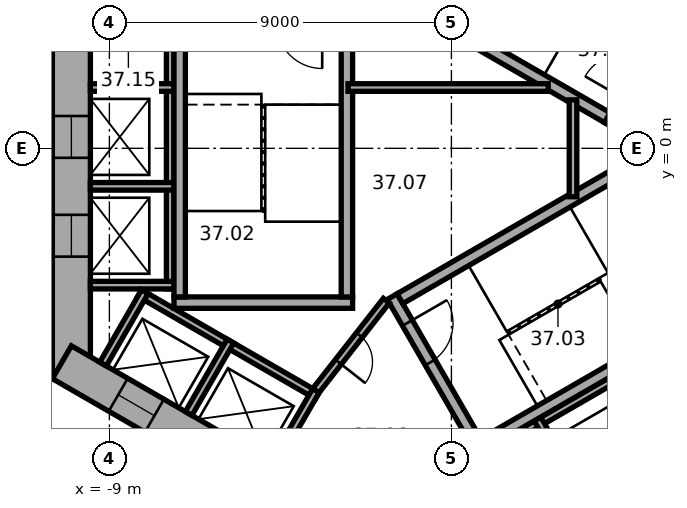
"""IFC4 building model, lengths in metres.
Left out: names, types, materials, properties, quantities, classifications, styles, units other than length and angle.
Written with IfcOpenShell. Run it as: python <this file> out.ifc"""

import sys

from ifc_helpers import new_model, si_unit, direction, frame, frame_2d, origin, place, context, subcontext, project, spatial, rectangle, extrude, element, fill, save


model = new_model("IFC4")
c1 = context("Model", 3, precision=1e-05, world=origin(), true_north=direction((0.0, 1.0)))
c2 = subcontext(c1, "Body", "Model", "MODEL_VIEW")
j1 = project(units=[si_unit("LENGTHUNIT", "METRE"), si_unit("PLANEANGLEUNIT", "RADIAN")], contexts=[c1])
p1 = place(None, origin())
s1 = spatial("IfcSite", under=j1, at=p1, CompositionType="ELEMENT")
p2 = place(p1, origin())
s2 = spatial("IfcBuilding", under=s1, at=p2, CompositionType="ELEMENT")
p3 = place(p2, frame((0.0, 0.0, 154.0)))
s3 = spatial("IfcBuildingStorey", under=s2, at=p3, CompositionType="ELEMENT", Elevation=154.0)
p4 = place(p3, frame((-10.0, 6.062, 0.0), z_axis=(0.0, 0.0, 1.0), x_axis=(0.0, -1.0, 0.0)))
e1 = element("IfcWall", 1, at=p4, inside=s3, PredefinedType="SHEAR", context=c2, shape_type="SweptSolid", body=[
    extrude(rectangle(XDim=12.125, YDim=1.0, at=frame_2d((6.062, 0.0))), origin(), (0.0, 0.0, 1.0), 3.7),
])
p5 = place(p4, frame((5.212, 0.0, 0.0)))
e2 = element("IfcOpeningElement", 2, at=p5, cuts=e1, PredefinedType="OPENING", context=c2, shape_type="SweptSolid", body=[
    extrude(rectangle(XDim=1.1, YDim=2.1, at=frame_2d((0.55, 1.05))), frame((0.0, 0.51, 0.0), z_axis=(0.0, -1.0, 0.0), x_axis=(1.0, 0.0, 0.0)), (0.0, 0.0, 1.0), 1.02),
])
p6 = place(p4, frame((7.812, 0.0, 0.0)))
e3 = element("IfcOpeningElement", 3, at=p6, cuts=e1, PredefinedType="OPENING", context=c2, shape_type="SweptSolid", body=[
    extrude(rectangle(XDim=1.1, YDim=2.1, at=frame_2d((0.55, 1.05))), frame((0.0, 0.51, 0.0), z_axis=(0.0, -1.0, 0.0), x_axis=(1.0, 0.0, 0.0)), (0.0, 0.0, 1.0), 1.02),
])
p7 = place(p3, frame((-10.25, -5.629, 0.0), z_axis=(0.0, 0.0, 1.0), x_axis=(0.866022616891, -0.50000482701, 0.0)))
e4 = element("IfcWall", 4, at=p7, inside=s3, PredefinedType="SHEAR", context=c2, shape_type="SweptSolid", body=[
    extrude(rectangle(XDim=12.125, YDim=1.0, at=frame_2d((6.062, 0.0))), origin(), (0.0, 0.0, 1.0), 3.7),
])
p8 = place(p7, frame((6.262, 0.0, 0.0)))
e5 = element("IfcOpeningElement", 5, at=p8, cuts=e4, PredefinedType="OPENING", context=c2, shape_type="SweptSolid", body=[
    extrude(rectangle(XDim=1.5, YDim=2.1, at=frame_2d((0.75, 1.05))), frame((0.0, 0.51, 0.0), z_axis=(0.0, -1.0, 0.0), x_axis=(1.0, 0.0, 0.0)), (0.0, 0.0, 1.0), 1.02),
])
p9 = place(p7, frame((1.712, 0.0, 0.0)))
e6 = element("IfcOpeningElement", 6, at=p9, cuts=e4, PredefinedType="OPENING", context=c2, shape_type="SweptSolid", body=[
    extrude(rectangle(XDim=1.1, YDim=2.1, at=frame_2d((0.55, 1.05))), frame((0.0, 0.51, 0.0), z_axis=(0.0, -1.0, 0.0), x_axis=(1.0, 0.0, 0.0)), (0.0, 0.0, 1.0), 1.02),
])
p10 = place(p7, frame((4.312, 0.0, 0.0)))
e7 = element("IfcOpeningElement", 7, at=p10, cuts=e4, PredefinedType="OPENING", context=c2, shape_type="SweptSolid", body=[
    extrude(rectangle(XDim=1.1, YDim=2.1, at=frame_2d((0.55, 1.05))), frame((0.0, 0.51, 0.0), z_axis=(0.0, -1.0, 0.0), x_axis=(1.0, 0.0, 0.0)), (0.0, 0.0, 1.0), 1.02),
])
p11 = place(p3, frame((-0.25, -11.691, 0.0), z_axis=(0.0, 0.0, 1.0), x_axis=(0.866022616891, 0.50000482701, 0.0)))
e8 = element("IfcWall", 8, at=p11, inside=s3, PredefinedType="SHEAR", context=c2, shape_type="SweptSolid", body=[
    extrude(rectangle(XDim=12.125, YDim=1.0, at=frame_2d((6.062, 0.0))), origin(), (0.0, 0.0, 1.0), 3.7),
])
p12 = place(p11, frame((2.612, 0.0, 0.0)))
e9 = element("IfcOpeningElement", 9, at=p12, cuts=e8, PredefinedType="OPENING", context=c2, shape_type="SweptSolid", body=[
    extrude(rectangle(XDim=1.1, YDim=2.1, at=frame_2d((0.55, 1.05))), frame((0.0, 0.51, 0.0), z_axis=(0.0, -1.0, 0.0), x_axis=(1.0, 0.0, 0.0)), (0.0, 0.0, 1.0), 1.02),
])
p13 = place(p11, frame((5.212, 0.0, 0.0)))
e10 = element("IfcOpeningElement", 10, at=p13, cuts=e8, PredefinedType="OPENING", context=c2, shape_type="SweptSolid", body=[
    extrude(rectangle(XDim=1.1, YDim=2.1, at=frame_2d((0.55, 1.05))), frame((0.0, 0.51, 0.0), z_axis=(0.0, -1.0, 0.0), x_axis=(1.0, 0.0, 0.0)), (0.0, 0.0, 1.0), 1.02),
])
p14 = place(p11, frame((7.812, 0.0, 0.0)))
e11 = element("IfcOpeningElement", 11, at=p14, cuts=e8, PredefinedType="OPENING", context=c2, shape_type="SweptSolid", body=[
    extrude(rectangle(XDim=1.1, YDim=2.1, at=frame_2d((0.55, 1.05))), frame((0.0, 0.51, 0.0), z_axis=(0.0, -1.0, 0.0), x_axis=(1.0, 0.0, 0.0)), (0.0, 0.0, 1.0), 1.02),
])
p15 = place(p3, frame((-7.4, 4.3, 0.0), z_axis=(0.0, 0.0, 1.0), x_axis=(0.0, -1.0, 0.0)))
e12 = element("IfcWall", 12, at=p15, inside=s3, PredefinedType="PARTITIONING", context=c2, shape_type="SweptSolid", body=[
    extrude(rectangle(XDim=8.0, YDim=0.2, at=frame_2d((4.0, 0.0))), origin(), (0.0, 0.0, 1.0), 3.42),
])
for number, where, z_axis, x_axis in (
    (13, (-7.3, 1.6, 0.0), (0.0, 0.0, 1.0), (-1.0, 0.0, 0.0)),
    (14, (-7.3, -1.0, 0.0), (0.0, 0.0, 1.0), (-1.0, 0.0, 0.0)),
    (15, (-7.3, -3.6, 0.0), (0.0, 0.0, 1.0), (-1.0, 0.0, 0.0)),
):
    element("IfcWall", number, at=place(p3, frame(where, z_axis=z_axis, x_axis=x_axis)), inside=s3, PredefinedType="PARTITIONING", context=c2, shape_type="SweptSolid", body=[
        extrude(rectangle(XDim=2.2, YDim=0.2, at=frame_2d((1.1, 0.0))), origin(), (0.0, 0.0, 1.0), 3.42),
    ])
p16 = place(p3, frame((-8.203, -3.809, 0.0), z_axis=(0.0, 0.0, 1.0), x_axis=(0.866028230842, -0.499995103361, 0.0)))
e16 = element("IfcWall", 16, at=p16, inside=s3, PredefinedType="PARTITIONING", context=c2, shape_type="SweptSolid", body=[
    extrude(rectangle(XDim=5.4, YDim=0.2, at=frame_2d((2.7, 0.0))), origin(), (0.0, 0.0, 1.0), 3.42),
])
for number, where, z_axis, x_axis in (
    (17, (-8.067, -3.772, 0.0), (0.0, 0.0, 1.0), (-0.5, -0.866, 0.0)),
    (18, (-5.815, -5.072, 0.0), (0.0, 0.0, 1.0), (-0.5, -0.866, 0.0)),
):
    element("IfcWall", number, at=place(p3, frame(where, z_axis=z_axis, x_axis=x_axis)), inside=s3, PredefinedType="PARTITIONING", context=c2, shape_type="SweptSolid", body=[
        extrude(rectangle(XDim=2.2, YDim=0.2, at=frame_2d((1.1, 0.0))), origin(), (0.0, 0.0, 1.0), 3.42),
    ])
p17 = place(p3, frame((-3.563, -6.372, 0.0), z_axis=(0.0, 0.0, 1.0), x_axis=(-0.499994660107, -0.866028486751, 0.0)))
e19 = element("IfcWall", 19, at=p17, inside=s3, PredefinedType="PARTITIONING", context=c2, shape_type="SweptSolid", body=[
    extrude(rectangle(XDim=2.2, YDim=0.2, at=frame_2d((1.1, 0.0))), origin(), (0.0, 0.0, 1.0), 3.42),
])
p18 = place(p3, frame((-0.024, -8.559, 0.0), z_axis=(0.0, 0.0, 1.0), x_axis=(0.866026010844, 0.49999894854, 0.0)))
e20 = element("IfcWall", 20, at=p18, inside=s3, PredefinedType="PARTITIONING", context=c2, shape_type="SweptSolid", body=[
    extrude(rectangle(XDim=8.0, YDim=0.2, at=frame_2d((4.0, 0.0))), origin(), (0.0, 0.0, 1.0), 3.42),
])
p19 = place(p3, frame((2.264, -7.122, 0.0), z_axis=(0.0, 0.0, 1.0), x_axis=(0.500077893725, -0.86598042715, 0.0)))
e21 = element("IfcWall", 21, at=p19, inside=s3, PredefinedType="PARTITIONING", context=c2, shape_type="SweptSolid", body=[
    extrude(rectangle(XDim=2.2, YDim=0.2, at=frame_2d((1.1, 0.0))), origin(), (0.0, 0.0, 1.0), 3.42),
])
p20 = place(p3, frame((4.158, 0.602, 0.0), z_axis=(0.0, 0.0, 1.0), x_axis=(0.499977259774, 0.866038532462, 0.0)))
e22 = element("IfcWall", 22, at=p20, inside=s3, PredefinedType="SHEAR", context=c2, shape_type="SweptSolid", body=[
    extrude(rectangle(XDim=4.7, YDim=0.3, at=frame_2d((2.35, 0.0))), origin(), (0.0, 0.0, 1.0), 3.42),
])
p21 = place(p20, frame((0.8, 0.0, 0.0)))
e23 = element("IfcOpeningElement", 23, at=p21, cuts=e22, PredefinedType="OPENING", context=c2, shape_type="SweptSolid", body=[
    extrude(rectangle(XDim=1.2, YDim=2.1, at=frame_2d((0.6, 1.05))), frame((0.0, 0.16, 0.0), z_axis=(0.0, -1.0, 0.0), x_axis=(1.0, 0.0, 0.0)), (0.0, 0.0, 1.0), 0.32),
])
p22 = place(p3, frame((4.103, 0.807, 0.0), z_axis=(0.0, 0.0, 1.0), x_axis=(-0.866027801685, 0.499995846692, 0.0)))
e24 = element("IfcWall", 24, at=p22, inside=s3, PredefinedType="SHEAR", context=c2, shape_type="SweptSolid", body=[
    extrude(rectangle(XDim=7.06, YDim=0.3, at=frame_2d((3.53, 0.0))), origin(), (0.0, 0.0, 1.0), 3.42),
])
p23 = place(p3, frame((-2.6, -4.06, 0.0), z_axis=(0.0, 0.0, 1.0), x_axis=(-1.0, 0.0, 0.0)))
e25 = element("IfcWall", 25, at=p23, inside=s3, PredefinedType="SHEAR", context=c2, shape_type="SweptSolid", body=[
    extrude(rectangle(XDim=4.7, YDim=0.3, at=frame_2d((2.35, 0.0))), origin(), (0.0, 0.0, 1.0), 3.42),
])
for number, where, z_axis, x_axis in (
    (26, (-2.75, 3.15, 0.0), (0.0, 0.0, 1.0), (0.0, -1.0, 0.0)),
    (27, (-7.15, 3.15, 0.0), (0.0, 0.0, 1.0), (0.0, -1.0, 0.0)),
):
    element("IfcWall", number, at=place(p3, frame(where, z_axis=z_axis, x_axis=x_axis)), inside=s3, PredefinedType="SHEAR", context=c2, shape_type="SweptSolid", body=[
        extrude(rectangle(XDim=7.06, YDim=0.3, at=frame_2d((3.53, 0.0))), origin(), (0.0, 0.0, 1.0), 3.42),
    ])
p24 = place(p3, frame((-1.558, -3.902, 0.0), z_axis=(0.0, 0.0, 1.0), x_axis=(0.499977259774, -0.866038532462, 0.0)))
e28 = element("IfcWall", 28, at=p24, inside=s3, PredefinedType="SHEAR", context=c2, shape_type="SweptSolid", body=[
    extrude(rectangle(XDim=4.7, YDim=0.3, at=frame_2d((2.35, 0.0))), origin(), (0.0, 0.0, 1.0), 3.42),
])
p25 = place(p24, frame((0.8, 0.0, 0.0)))
e29 = element("IfcOpeningElement", 29, at=p25, cuts=e28, PredefinedType="OPENING", context=c2, shape_type="SweptSolid", body=[
    extrude(rectangle(XDim=1.2, YDim=2.1, at=frame_2d((0.6, 1.05))), frame((0.0, 0.16, 0.0), z_axis=(0.0, -1.0, 0.0), x_axis=(1.0, 0.0, 0.0)), (0.0, 0.0, 1.0), 0.32),
])
for number, where, z_axis, x_axis in (
    (30, (-1.353, -3.957, 0.0), (0.0, 0.0, 1.0), (0.866, 0.5, 0.0)),
    (31, (0.847, -7.767, 0.0), (0.0, 0.0, 1.0), (0.866, 0.5, 0.0)),
):
    element("IfcWall", number, at=place(p3, frame(where, z_axis=z_axis, x_axis=x_axis)), inside=s3, PredefinedType="SHEAR", context=c2, shape_type="SweptSolid", body=[
        extrude(rectangle(XDim=7.06, YDim=0.3, at=frame_2d((3.53, 0.0))), origin(), (0.0, 0.0, 1.0), 3.42),
    ])
p26 = place(p3, frame((-1.712, -4.008, 0.0), z_axis=(0.0, 0.0, 1.0), x_axis=(-0.616549420702, -0.787316208287, 0.0)))
e32 = element("IfcWall", 32, at=p26, inside=s3, PredefinedType="PARTITIONING", context=c2, shape_type="SweptSolid", body=[
    extrude(rectangle(XDim=3.002, YDim=0.2, at=frame_2d((1.501, 0.0))), origin(), (0.0, 0.0, 1.0), 3.42),
])
p27 = place(p26, frame((1.15, 0.0, 0.0)))
e33 = element("IfcOpeningElement", 33, at=p27, cuts=e32, PredefinedType="OPENING", context=c2, shape_type="SweptSolid", body=[
    extrude(rectangle(XDim=0.9, YDim=2.1, at=frame_2d((0.45, 1.05))), frame((0.0, 0.11, 0.0), z_axis=(0.0, -1.0, 0.0), x_axis=(1.0, 0.0, 0.0)), (0.0, 0.0, 1.0), 0.22),
])
p28 = place(p3, frame((-2.72, 1.6, 0.0), z_axis=(0.0, 0.0, 1.0), x_axis=(1.0, 0.0, 0.0)))
e34 = element("IfcWall", 34, at=p28, inside=s3, PredefinedType="PARTITIONING", context=c2, shape_type="SweptSolid", body=[
    extrude(rectangle(XDim=5.269, YDim=0.2, at=frame_2d((2.634, 0.0))), origin(), (0.0, 0.0, 1.0), 3.42),
])
p29 = place(p3, frame((3.2, -1.275, 0.0), z_axis=(0.0, 0.0, 1.0), x_axis=(0.0, 1.0, 0.0)))
e35 = element("IfcWall", 35, at=p29, inside=s3, PredefinedType="PARTITIONING", context=c2, shape_type="SweptSolid", body=[
    extrude(rectangle(XDim=2.549, YDim=0.2, at=frame_2d((1.275, 0.0))), origin(), (0.0, 0.0, 1.0), 3.42),
])
p30 = place(p25, origin())
e36 = element("IfcDoor", 36, at=p30, inside=s3, OperationType="SINGLE_SWING_RIGHT", PredefinedType="DOOR", context=c2, shape_type="SweptSolid", body=[
    extrude(rectangle(XDim=1.2, YDim=2.1, at=frame_2d((0.6, 1.05))), frame((0.0, 0.025, 0.0), z_axis=(0.0, -1.0, 0.0), x_axis=(1.0, 0.0, 0.0)), (0.0, 0.0, 1.0), 0.05),
])
fill(e29, e36)
p31 = place(p27, origin())
e37 = element("IfcDoor", 37, at=p31, inside=s3, OperationType="SINGLE_SWING_LEFT", PredefinedType="DOOR", context=c2, shape_type="SweptSolid", body=[
    extrude(rectangle(XDim=0.9, YDim=2.1, at=frame_2d((0.45, 1.05))), frame((0.0, 0.025, 0.0), z_axis=(0.0, -1.0, 0.0), x_axis=(1.0, 0.0, 0.0)), (0.0, 0.0, 1.0), 0.05),
])
fill(e33, e37)
p32 = place(p5, origin())
e38 = element("IfcDoor", 38, at=p32, inside=s3, OperationType="DOUBLE_DOOR_SLIDING", PredefinedType="DOOR", context=c2, shape_type="SweptSolid", body=[
    extrude(rectangle(XDim=1.1, YDim=2.1, at=frame_2d((0.55, 1.05))), frame((0.0, 0.025, 0.0), z_axis=(0.0, -1.0, 0.0), x_axis=(1.0, 0.0, 0.0)), (0.0, 0.0, 1.0), 0.05),
])
fill(e2, e38)
p33 = place(p6, origin())
e39 = element("IfcDoor", 39, at=p33, inside=s3, OperationType="DOUBLE_DOOR_SLIDING", PredefinedType="DOOR", context=c2, shape_type="SweptSolid", body=[
    extrude(rectangle(XDim=1.1, YDim=2.1, at=frame_2d((0.55, 1.05))), frame((0.0, 0.025, 0.0), z_axis=(0.0, -1.0, 0.0), x_axis=(1.0, 0.0, 0.0)), (0.0, 0.0, 1.0), 0.05),
])
fill(e3, e39)
p34 = place(p9, origin())
e40 = element("IfcDoor", 40, at=p34, inside=s3, OperationType="DOUBLE_DOOR_SLIDING", PredefinedType="DOOR", context=c2, shape_type="SweptSolid", body=[
    extrude(rectangle(XDim=1.1, YDim=2.1, at=frame_2d((0.55, 1.05))), frame((0.0, 0.025, 0.0), z_axis=(0.0, -1.0, 0.0), x_axis=(1.0, 0.0, 0.0)), (0.0, 0.0, 1.0), 0.05),
])
fill(e6, e40)
save(model, sys.argv[1])
